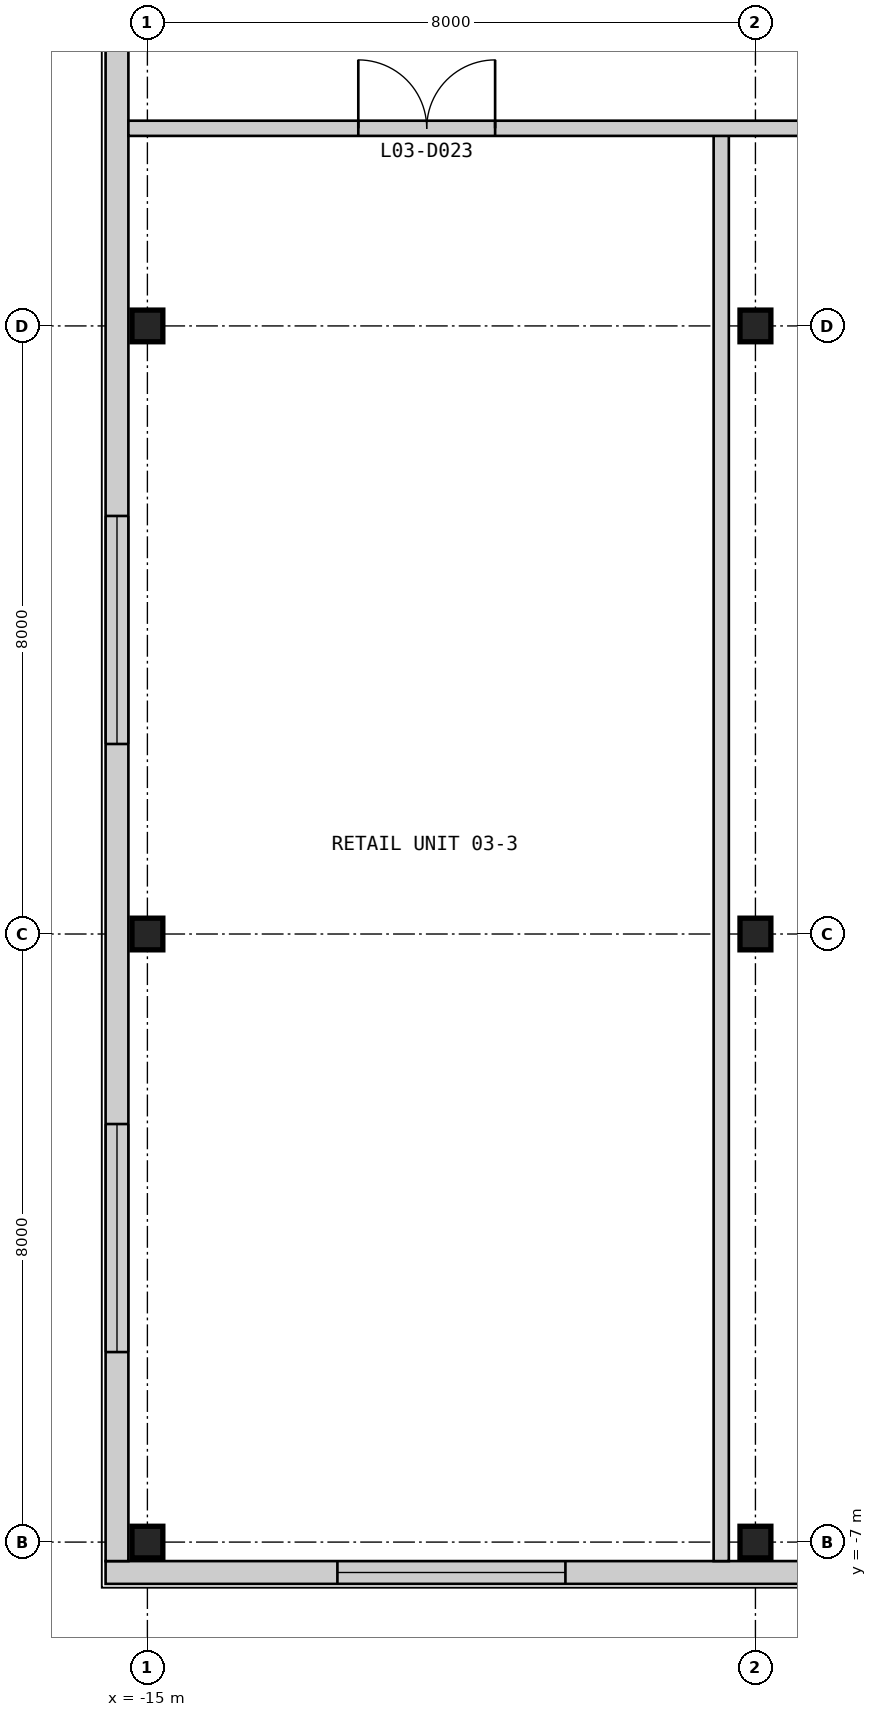
"""IFC4 building model, lengths in metres.
Left out: names, types, materials, properties, quantities, classifications, styles, units other than length and angle.
Written with IfcOpenShell. Run it as: python <this file> out.ifc"""

import sys

from ifc_helpers import new_model, si_unit, direction, frame, frame_2d, origin, origin_2d, place, context, subcontext, project, spatial, rectangle, i_section, extrude, element, fill, save


model = new_model("IFC4")
c1 = context("Model", 3, precision=1e-05, world=origin(), true_north=direction((0.0, 1.0)))
c2 = subcontext(c1, "Body", "Model", "MODEL_VIEW")
j1 = project(units=[si_unit("LENGTHUNIT", "METRE"), si_unit("PLANEANGLEUNIT", "RADIAN")], contexts=[c1])
p1 = place(None, origin())
s1 = spatial("IfcSite", under=j1, at=p1, CompositionType="ELEMENT")
p2 = place(p1, origin())
s2 = spatial("IfcBuilding", under=s1, at=p2, CompositionType="ELEMENT")
p3 = place(p2, frame((0.0, 0.0, 16.6)))
s3 = spatial("IfcBuildingStorey", under=s2, at=p3, CompositionType="ELEMENT", Elevation=16.6)
for number, where, z_axis, x_axis in (
    (1, (-15.0, -7.0, 0.0), (0.0, 0.0, 1.0), (1.0, 0.0, 0.0)),
    (2, (-15.0, 1.0, 0.0), (0.0, 0.0, 1.0), (1.0, 0.0, 0.0)),
    (3, (-15.0, 9.0, 0.0), (0.0, 0.0, 1.0), (1.0, 0.0, 0.0)),
    (4, (-7.0, -7.0, 0.0), (0.0, 0.0, 1.0), (1.0, 0.0, 0.0)),
    (5, (-7.0, 1.0, 0.0), (0.0, 0.0, 1.0), (1.0, 0.0, 0.0)),
    (6, (-7.0, 9.0, 0.0), (0.0, 0.0, 1.0), (1.0, 0.0, 0.0)),
):
    element("IfcColumn", number, at=place(p3, frame(where, z_axis=z_axis, x_axis=x_axis)), inside=s3, PredefinedType="COLUMN", context=c2, shape_type="SweptSolid", body=[
        extrude(i_section(OverallWidth=0.406, OverallDepth=0.417, WebThickness=0.03, FlangeThickness=0.048, at=origin_2d()), origin(), (0.0, 0.0, 1.0), 4.8),
    ])
p4 = place(p3, frame((-15.55, -7.4, 0.0), z_axis=(0.0, 0.0, 1.0), x_axis=(1.0, 0.0, 0.0)))
e7 = element("IfcWall", 7, at=p4, inside=s3, PredefinedType="SOLIDWALL", context=c2, shape_type="SweptSolid", body=[
    extrude(rectangle(XDim=73.1, YDim=0.3, at=frame_2d((36.55, 0.0))), origin(), (0.0, 0.0, 1.0), 4.5),
])
p5 = place(p4, frame((3.05, 0.0, 0.9)))
e8 = element("IfcOpeningElement", 8, at=p5, cuts=e7, PredefinedType="OPENING", context=c2, shape_type="SweptSolid", body=[
    extrude(rectangle(XDim=3.0, YDim=2.4, at=frame_2d((1.5, 1.2))), frame((0.0, 0.16, 0.0), z_axis=(0.0, -1.0, 0.0), x_axis=(1.0, 0.0, 0.0)), (0.0, 0.0, 1.0), 0.32),
])
p6 = place(p4, frame((11.05, 0.0, 0.9)))
e9 = element("IfcOpeningElement", 9, at=p6, cuts=e7, PredefinedType="OPENING", context=c2, shape_type="SweptSolid", body=[
    extrude(rectangle(XDim=3.0, YDim=2.4, at=frame_2d((1.5, 1.2))), frame((0.0, 0.16, 0.0), z_axis=(0.0, -1.0, 0.0), x_axis=(1.0, 0.0, 0.0)), (0.0, 0.0, 1.0), 0.32),
])
p7 = place(p4, frame((19.05, 0.0, 0.9)))
e10 = element("IfcOpeningElement", 10, at=p7, cuts=e7, PredefinedType="OPENING", context=c2, shape_type="SweptSolid", body=[
    extrude(rectangle(XDim=3.0, YDim=2.4, at=frame_2d((1.5, 1.2))), frame((0.0, 0.16, 0.0), z_axis=(0.0, -1.0, 0.0), x_axis=(1.0, 0.0, 0.0)), (0.0, 0.0, 1.0), 0.32),
])
p8 = place(p4, frame((33.05, 0.0, 0.9)))
e11 = element("IfcOpeningElement", 11, at=p8, cuts=e7, PredefinedType="OPENING", context=c2, shape_type="SweptSolid", body=[
    extrude(rectangle(XDim=3.0, YDim=2.4, at=frame_2d((1.5, 1.2))), frame((0.0, 0.16, 0.0), z_axis=(0.0, -1.0, 0.0), x_axis=(1.0, 0.0, 0.0)), (0.0, 0.0, 1.0), 0.32),
])
p9 = place(p4, frame((45.05, 0.0, 0.9)))
e12 = element("IfcOpeningElement", 12, at=p9, cuts=e7, PredefinedType="OPENING", context=c2, shape_type="SweptSolid", body=[
    extrude(rectangle(XDim=3.0, YDim=2.4, at=frame_2d((1.5, 1.2))), frame((0.0, 0.16, 0.0), z_axis=(0.0, -1.0, 0.0), x_axis=(1.0, 0.0, 0.0)), (0.0, 0.0, 1.0), 0.32),
])
p10 = place(p4, frame((53.55, 0.0, 0.9)))
e13 = element("IfcOpeningElement", 13, at=p10, cuts=e7, PredefinedType="OPENING", context=c2, shape_type="SweptSolid", body=[
    extrude(rectangle(XDim=3.0, YDim=2.4, at=frame_2d((1.5, 1.2))), frame((0.0, 0.16, 0.0), z_axis=(0.0, -1.0, 0.0), x_axis=(1.0, 0.0, 0.0)), (0.0, 0.0, 1.0), 0.32),
])
p11 = place(p4, frame((59.55, 0.0, 0.9)))
e14 = element("IfcOpeningElement", 14, at=p11, cuts=e7, PredefinedType="OPENING", context=c2, shape_type="SweptSolid", body=[
    extrude(rectangle(XDim=3.0, YDim=2.4, at=frame_2d((1.5, 1.2))), frame((0.0, 0.16, 0.0), z_axis=(0.0, -1.0, 0.0), x_axis=(1.0, 0.0, 0.0)), (0.0, 0.0, 1.0), 0.32),
])
p12 = place(p4, frame((67.05, 0.0, 0.9)))
e15 = element("IfcOpeningElement", 15, at=p12, cuts=e7, PredefinedType="OPENING", context=c2, shape_type="SweptSolid", body=[
    extrude(rectangle(XDim=3.0, YDim=2.4, at=frame_2d((1.5, 1.2))), frame((0.0, 0.16, 0.0), z_axis=(0.0, -1.0, 0.0), x_axis=(1.0, 0.0, 0.0)), (0.0, 0.0, 1.0), 0.32),
])
p13 = place(p3, frame((-15.4, 65.25, 0.0), z_axis=(0.0, 0.0, 1.0), x_axis=(0.0, -1.0, 0.0)))
e16 = element("IfcWall", 16, at=p13, inside=s3, PredefinedType="SOLIDWALL", context=c2, shape_type="SweptSolid", body=[
    extrude(rectangle(XDim=72.5, YDim=0.3, at=frame_2d((36.25, 0.0))), origin(), (0.0, 0.0, 1.0), 4.5),
])
p14 = place(p13, frame((66.75, 0.0, 0.9)))
e17 = element("IfcOpeningElement", 17, at=p14, cuts=e16, PredefinedType="OPENING", context=c2, shape_type="SweptSolid", body=[
    extrude(rectangle(XDim=3.0, YDim=2.4, at=frame_2d((1.5, 1.2))), frame((0.0, 0.16, 0.0), z_axis=(0.0, -1.0, 0.0), x_axis=(1.0, 0.0, 0.0)), (0.0, 0.0, 1.0), 0.32),
])
p15 = place(p13, frame((58.75, 0.0, 0.9)))
e18 = element("IfcOpeningElement", 18, at=p15, cuts=e16, PredefinedType="OPENING", context=c2, shape_type="SweptSolid", body=[
    extrude(rectangle(XDim=3.0, YDim=2.4, at=frame_2d((1.5, 1.2))), frame((0.0, 0.16, 0.0), z_axis=(0.0, -1.0, 0.0), x_axis=(1.0, 0.0, 0.0)), (0.0, 0.0, 1.0), 0.32),
])
p16 = place(p13, frame((44.75, 0.0, 0.9)))
e19 = element("IfcOpeningElement", 19, at=p16, cuts=e16, PredefinedType="OPENING", context=c2, shape_type="SweptSolid", body=[
    extrude(rectangle(XDim=3.0, YDim=2.4, at=frame_2d((1.5, 1.2))), frame((0.0, 0.16, 0.0), z_axis=(0.0, -1.0, 0.0), x_axis=(1.0, 0.0, 0.0)), (0.0, 0.0, 1.0), 0.32),
])
p17 = place(p13, frame((32.75, 0.0, 0.9)))
e20 = element("IfcOpeningElement", 20, at=p17, cuts=e16, PredefinedType="OPENING", context=c2, shape_type="SweptSolid", body=[
    extrude(rectangle(XDim=3.0, YDim=2.4, at=frame_2d((1.5, 1.2))), frame((0.0, 0.16, 0.0), z_axis=(0.0, -1.0, 0.0), x_axis=(1.0, 0.0, 0.0)), (0.0, 0.0, 1.0), 0.32),
])
p18 = place(p13, frame((24.25, 0.0, 0.9)))
e21 = element("IfcOpeningElement", 21, at=p18, cuts=e16, PredefinedType="OPENING", context=c2, shape_type="SweptSolid", body=[
    extrude(rectangle(XDim=3.0, YDim=2.4, at=frame_2d((1.5, 1.2))), frame((0.0, 0.16, 0.0), z_axis=(0.0, -1.0, 0.0), x_axis=(1.0, 0.0, 0.0)), (0.0, 0.0, 1.0), 0.32),
])
p19 = place(p13, frame((18.25, 0.0, 0.9)))
e22 = element("IfcOpeningElement", 22, at=p19, cuts=e16, PredefinedType="OPENING", context=c2, shape_type="SweptSolid", body=[
    extrude(rectangle(XDim=3.0, YDim=2.4, at=frame_2d((1.5, 1.2))), frame((0.0, 0.16, 0.0), z_axis=(0.0, -1.0, 0.0), x_axis=(1.0, 0.0, 0.0)), (0.0, 0.0, 1.0), 0.32),
])
p20 = place(p13, frame((10.75, 0.0, 0.9)))
e23 = element("IfcOpeningElement", 23, at=p20, cuts=e16, PredefinedType="OPENING", context=c2, shape_type="SweptSolid", body=[
    extrude(rectangle(XDim=3.0, YDim=2.4, at=frame_2d((1.5, 1.2))), frame((0.0, 0.16, 0.0), z_axis=(0.0, -1.0, 0.0), x_axis=(1.0, 0.0, 0.0)), (0.0, 0.0, 1.0), 0.32),
])
p21 = place(p13, frame((2.75, 0.0, 0.9)))
e24 = element("IfcOpeningElement", 24, at=p21, cuts=e16, PredefinedType="OPENING", context=c2, shape_type="SweptSolid", body=[
    extrude(rectangle(XDim=3.0, YDim=2.4, at=frame_2d((1.5, 1.2))), frame((0.0, 0.16, 0.0), z_axis=(0.0, -1.0, 0.0), x_axis=(1.0, 0.0, 0.0)), (0.0, 0.0, 1.0), 0.32),
])
p22 = place(p3, frame((-7.45, -7.25, 0.0), z_axis=(0.0, 0.0, 1.0), x_axis=(0.0, 1.0, 0.0)))
e25 = element("IfcWall", 25, at=p22, inside=s3, PredefinedType="PARTITIONING", context=c2, shape_type="SweptSolid", body=[
    extrude(rectangle(XDim=18.85, YDim=0.2, at=frame_2d((9.425, 0.0))), origin(), (0.0, 0.0, 1.0), 4.5),
])
p23 = place(p3, frame((-15.25, 11.6, 0.0), z_axis=(0.0, 0.0, 1.0), x_axis=(1.0, 0.0, 0.0)))
e26 = element("IfcWall", 26, at=p23, inside=s3, PredefinedType="PARTITIONING", context=c2, shape_type="SweptSolid", body=[
    extrude(rectangle(XDim=22.25, YDim=0.2, at=frame_2d((11.125, 0.0))), origin(), (0.0, 0.0, 1.0), 4.5),
])
p24 = place(p23, frame((10.325, 0.0, 0.0)))
e27 = element("IfcOpeningElement", 27, at=p24, cuts=e26, PredefinedType="OPENING", context=c2, shape_type="SweptSolid", body=[
    extrude(rectangle(XDim=1.8, YDim=2.4, at=frame_2d((0.9, 1.2))), frame((0.0, 0.11, 0.0), z_axis=(0.0, -1.0, 0.0), x_axis=(1.0, 0.0, 0.0)), (0.0, 0.0, 1.0), 0.22),
])
p25 = place(p23, frame((3.025, 0.0, 0.0)))
e28 = element("IfcOpeningElement", 28, at=p25, cuts=e26, PredefinedType="OPENING", context=c2, shape_type="SweptSolid", body=[
    extrude(rectangle(XDim=1.8, YDim=2.4, at=frame_2d((0.9, 1.2))), frame((0.0, 0.11, 0.0), z_axis=(0.0, -1.0, 0.0), x_axis=(1.0, 0.0, 0.0)), (0.0, 0.0, 1.0), 0.22),
])
p26 = place(p23, frame((17.975, 0.0, 0.0)))
e29 = element("IfcOpeningElement", 29, at=p26, cuts=e26, PredefinedType="OPENING", context=c2, shape_type="SweptSolid", body=[
    extrude(rectangle(XDim=0.9, YDim=2.2, at=frame_2d((0.45, 1.1))), frame((0.0, 0.11, 0.0), z_axis=(0.0, -1.0, 0.0), x_axis=(1.0, 0.0, 0.0)), (0.0, 0.0, 1.0), 0.22),
])
p27 = place(p5, origin())
e30 = element("IfcWindow", 30, at=p27, inside=s3, PartitioningType="SINGLE_PANEL", PredefinedType="WINDOW", context=c2, shape_type="SweptSolid", body=[
    extrude(rectangle(XDim=3.0, YDim=2.4, at=frame_2d((1.5, 1.2))), frame((0.0, 0.03, 0.0), z_axis=(0.0, -1.0, 0.0), x_axis=(1.0, 0.0, 0.0)), (0.0, 0.0, 1.0), 0.06),
])
fill(e8, e30)
p28 = place(p14, origin())
e31 = element("IfcWindow", 31, at=p28, inside=s3, PartitioningType="SINGLE_PANEL", PredefinedType="WINDOW", context=c2, shape_type="SweptSolid", body=[
    extrude(rectangle(XDim=3.0, YDim=2.4, at=frame_2d((1.5, 1.2))), frame((0.0, 0.03, 0.0), z_axis=(0.0, -1.0, 0.0), x_axis=(1.0, 0.0, 0.0)), (0.0, 0.0, 1.0), 0.06),
])
fill(e17, e31)
p29 = place(p15, origin())
e32 = element("IfcWindow", 32, at=p29, inside=s3, PartitioningType="SINGLE_PANEL", PredefinedType="WINDOW", context=c2, shape_type="SweptSolid", body=[
    extrude(rectangle(XDim=3.0, YDim=2.4, at=frame_2d((1.5, 1.2))), frame((0.0, 0.03, 0.0), z_axis=(0.0, -1.0, 0.0), x_axis=(1.0, 0.0, 0.0)), (0.0, 0.0, 1.0), 0.06),
])
fill(e18, e32)
p30 = place(p25, origin())
e33 = element("IfcDoor", 33, at=p30, inside=s3, OperationType="DOUBLE_DOOR_SINGLE_SWING", PredefinedType="DOOR", context=c2, shape_type="SweptSolid", body=[
    extrude(rectangle(XDim=1.8, YDim=2.4, at=frame_2d((0.9, 1.2))), frame((0.0, 0.025, 0.0), z_axis=(0.0, -1.0, 0.0), x_axis=(1.0, 0.0, 0.0)), (0.0, 0.0, 1.0), 0.05),
])
fill(e28, e33)
save(model, sys.argv[1])
